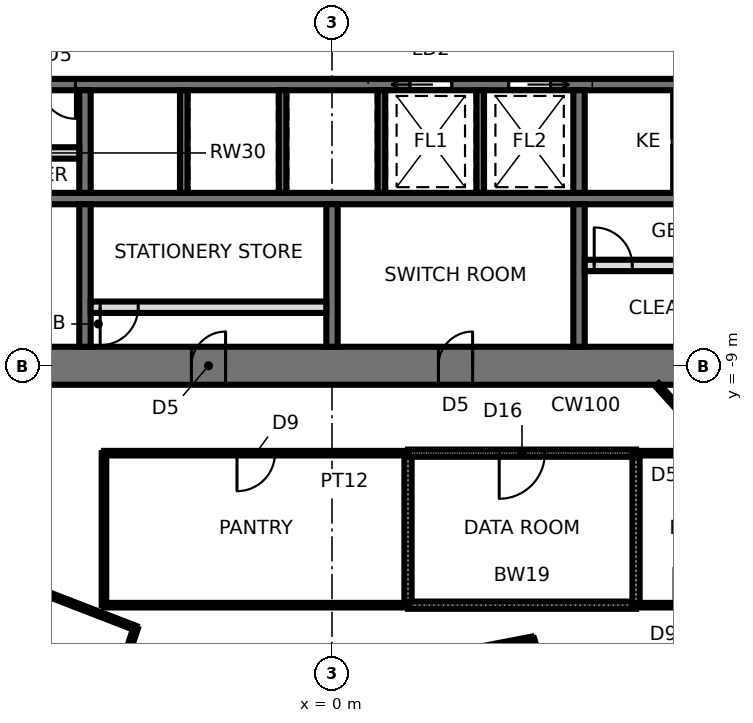
"""IFC4 building model, lengths in metres.
Left out: names, types, materials, properties, quantities, classifications, styles, units other than length and angle.
Written with IfcOpenShell. Run it as: python <this file> out.ifc"""

import sys

from ifc_helpers import new_model, si_unit, direction, frame, frame_2d, origin, place, context, subcontext, project, spatial, rectangle, extrude, element, fill, save


model = new_model("IFC4")
c1 = context("Model", 3, precision=1e-05, world=origin(), true_north=direction((0.0, 1.0)))
c2 = subcontext(c1, "Body", "Model", "MODEL_VIEW")
j1 = project(units=[si_unit("LENGTHUNIT", "METRE"), si_unit("PLANEANGLEUNIT", "RADIAN")], contexts=[c1])
p1 = place(None, origin())
s1 = spatial("IfcSite", under=j1, at=p1, CompositionType="ELEMENT")
p2 = place(p1, origin())
s2 = spatial("IfcBuilding", under=s1, at=p2, CompositionType="ELEMENT")
p3 = place(p2, frame((0.0, 0.0, 57.4)))
s3 = spatial("IfcBuildingStorey", under=s2, at=p3, CompositionType="ELEMENT", Elevation=57.4)
p4 = place(p3, frame((-13.2, -9.0, 0.0), z_axis=(0.0, 0.0, 1.0), x_axis=(1.0, 0.0, 0.0)))
e1 = element("IfcWall", 1, at=p4, inside=s3, PredefinedType="SHEAR", context=c2, shape_type="SweptSolid", body=[
    extrude(rectangle(XDim=26.4, YDim=1.0, at=frame_2d((13.2, 0.0))), origin(), (0.0, 0.0, 1.0), 4.2),
])
p5 = place(p4, frame((2.65, 0.0, 0.0)))
e2 = element("IfcOpeningElement", 2, at=p5, cuts=e1, PredefinedType="OPENING", context=c2, shape_type="SweptSolid", body=[
    extrude(rectangle(XDim=0.9, YDim=2.1, at=frame_2d((0.45, 1.05))), frame((0.0, 0.51, 0.0), z_axis=(0.0, -1.0, 0.0), x_axis=(1.0, 0.0, 0.0)), (0.0, 0.0, 1.0), 1.02),
])
p6 = place(p4, frame((9.5, 0.0, 0.0)))
e3 = element("IfcOpeningElement", 3, at=p6, cuts=e1, PredefinedType="OPENING", context=c2, shape_type="SweptSolid", body=[
    extrude(rectangle(XDim=0.9, YDim=2.1, at=frame_2d((0.45, 1.05))), frame((0.0, 0.51, 0.0), z_axis=(0.0, -1.0, 0.0), x_axis=(1.0, 0.0, 0.0)), (0.0, 0.0, 1.0), 1.02),
])
p7 = place(p4, frame((16.0, 0.0, 0.0)))
e4 = element("IfcOpeningElement", 4, at=p7, cuts=e1, PredefinedType="OPENING", context=c2, shape_type="SweptSolid", body=[
    extrude(rectangle(XDim=0.9, YDim=2.1, at=frame_2d((0.45, 1.05))), frame((0.0, 0.51, 0.0), z_axis=(0.0, -1.0, 0.0), x_axis=(1.0, 0.0, 0.0)), (0.0, 0.0, 1.0), 1.02),
])
p8 = place(p4, frame((22.85, 0.0, 0.0)))
e5 = element("IfcOpeningElement", 5, at=p8, cuts=e1, PredefinedType="OPENING", context=c2, shape_type="SweptSolid", body=[
    extrude(rectangle(XDim=0.9, YDim=2.1, at=frame_2d((0.45, 1.05))), frame((0.0, 0.51, 0.0), z_axis=(0.0, -1.0, 0.0), x_axis=(1.0, 0.0, 0.0)), (0.0, 0.0, 1.0), 1.02),
])
p9 = place(p3, frame((-13.2, -1.6, 0.0), z_axis=(0.0, 0.0, 1.0), x_axis=(1.0, 0.0, 0.0)))
e6 = element("IfcWall", 6, at=p9, inside=s3, PredefinedType="SHEAR", context=c2, shape_type="SweptSolid", body=[
    extrude(rectangle(XDim=26.4, YDim=0.3, at=frame_2d((13.2, 0.0))), origin(), (0.0, 0.0, 1.0), 4.2),
])
p10 = place(p9, frame((25.15, 0.0, 0.0)))
e7 = element("IfcOpeningElement", 7, at=p10, cuts=e6, PredefinedType="OPENING", context=c2, shape_type="SweptSolid", body=[
    extrude(rectangle(XDim=1.0, YDim=2.1, at=frame_2d((0.5, 1.05))), frame((0.0, 0.16, 0.0), z_axis=(0.0, -1.0, 0.0), x_axis=(1.0, 0.0, 0.0)), (0.0, 0.0, 1.0), 0.32),
])
p11 = place(p9, frame((15.25, 0.0, 0.0)))
e8 = element("IfcOpeningElement", 8, at=p11, cuts=e6, PredefinedType="OPENING", context=c2, shape_type="SweptSolid", body=[
    extrude(rectangle(XDim=1.1, YDim=2.3, at=frame_2d((0.55, 1.15))), frame((0.0, 0.16, 0.0), z_axis=(0.0, -1.0, 0.0), x_axis=(1.0, 0.0, 0.0)), (0.0, 0.0, 1.0), 0.32),
])
p12 = place(p9, frame((17.85, 0.0, 0.0)))
e9 = element("IfcOpeningElement", 9, at=p12, cuts=e6, PredefinedType="OPENING", context=c2, shape_type="SweptSolid", body=[
    extrude(rectangle(XDim=1.1, YDim=2.3, at=frame_2d((0.55, 1.15))), frame((0.0, 0.16, 0.0), z_axis=(0.0, -1.0, 0.0), x_axis=(1.0, 0.0, 0.0)), (0.0, 0.0, 1.0), 0.32),
])
p13 = place(p9, frame((5.55, 0.0, 0.0)))
e10 = element("IfcOpeningElement", 10, at=p13, cuts=e6, PredefinedType="OPENING", context=c2, shape_type="SweptSolid", body=[
    extrude(rectangle(XDim=0.9, YDim=2.1, at=frame_2d((0.45, 1.05))), frame((0.0, 0.16, 0.0), z_axis=(0.0, -1.0, 0.0), x_axis=(1.0, 0.0, 0.0)), (0.0, 0.0, 1.0), 0.32),
])
p14 = place(p3, frame((-13.2, -4.6, 0.0), z_axis=(0.0, 0.0, 1.0), x_axis=(1.0, 0.0, 0.0)))
e11 = element("IfcWall", 11, at=p14, inside=s3, PredefinedType="SHEAR", context=c2, shape_type="SweptSolid", body=[
    extrude(rectangle(XDim=26.4, YDim=0.3, at=frame_2d((13.2, 0.0))), origin(), (0.0, 0.0, 1.0), 4.2),
])
p15 = place(p3, frame((-6.5, -1.75, 0.0), z_axis=(0.0, 0.0, 1.0), x_axis=(0.0, -1.0, 0.0)))
e12 = element("IfcWall", 12, at=p15, inside=s3, PredefinedType="SHEAR", context=c2, shape_type="SweptSolid", body=[
    extrude(rectangle(XDim=2.7, YDim=0.3, at=frame_2d((1.35, 0.0))), origin(), (0.0, 0.0, 1.0), 4.2),
])
p16 = place(p3, frame((-6.5, -4.75, 0.0), z_axis=(0.0, 0.0, 1.0), x_axis=(0.0, -1.0, 0.0)))
e13 = element("IfcWall", 13, at=p16, inside=s3, PredefinedType="SHEAR", context=c2, shape_type="SweptSolid", body=[
    extrude(rectangle(XDim=3.75, YDim=0.3, at=frame_2d((1.875, 0.0))), origin(), (0.0, 0.0, 1.0), 4.2),
])
p17 = place(p3, frame((6.5, -1.75, 0.0), z_axis=(0.0, 0.0, 1.0), x_axis=(0.0, -1.0, 0.0)))
e14 = element("IfcWall", 14, at=p17, inside=s3, PredefinedType="SHEAR", context=c2, shape_type="SweptSolid", body=[
    extrude(rectangle(XDim=2.7, YDim=0.3, at=frame_2d((1.35, 0.0))), origin(), (0.0, 0.0, 1.0), 4.2),
])
p18 = place(p3, frame((6.5, -4.75, 0.0), z_axis=(0.0, 0.0, 1.0), x_axis=(0.0, -1.0, 0.0)))
e15 = element("IfcWall", 15, at=p18, inside=s3, PredefinedType="SHEAR", context=c2, shape_type="SweptSolid", body=[
    extrude(rectangle(XDim=3.75, YDim=0.3, at=frame_2d((1.875, 0.0))), origin(), (0.0, 0.0, 1.0), 4.2),
])
for number, where, z_axis, x_axis in (
    (16, (-3.9, -1.75, 0.0), (0.0, 0.0, 1.0), (0.0, -1.0, 0.0)),
    (17, (-1.3, -1.75, 0.0), (0.0, 0.0, 1.0), (0.0, -1.0, 0.0)),
    (18, (1.3, -1.75, 0.0), (0.0, 0.0, 1.0), (0.0, -1.0, 0.0)),
    (19, (3.9, -1.75, 0.0), (0.0, 0.0, 1.0), (0.0, -1.0, 0.0)),
):
    element("IfcWall", number, at=place(p3, frame(where, z_axis=z_axis, x_axis=x_axis)), inside=s3, PredefinedType="SHEAR", context=c2, shape_type="SweptSolid", body=[
        extrude(rectangle(XDim=2.7, YDim=0.2, at=frame_2d((1.35, 0.0))), origin(), (0.0, 0.0, 1.0), 4.2),
    ])
p19 = place(p3, frame((0.0, -4.75, 0.0), z_axis=(0.0, 0.0, 1.0), x_axis=(0.0, -1.0, 0.0)))
e20 = element("IfcWall", 20, at=p19, inside=s3, PredefinedType="SHEAR", context=c2, shape_type="SweptSolid", body=[
    extrude(rectangle(XDim=3.75, YDim=0.3, at=frame_2d((1.875, 0.0))), origin(), (0.0, 0.0, 1.0), 4.2),
])
p20 = place(p3, frame((-6.35, -7.46, 0.0), z_axis=(0.0, 0.0, 1.0), x_axis=(1.0, 0.0, 0.0)))
e21 = element("IfcWall", 21, at=p20, inside=s3, PredefinedType="PARTITIONING", context=c2, shape_type="SweptSolid", body=[
    extrude(rectangle(XDim=6.2, YDim=0.3, at=frame_2d((3.1, 0.0))), origin(), (0.0, 0.0, 1.0), 4.04),
])
p21 = place(p20, frame((0.25, 0.0, 0.0)))
e22 = element("IfcOpeningElement", 22, at=p21, cuts=e21, PredefinedType="OPENING", context=c2, shape_type="SweptSolid", body=[
    extrude(rectangle(XDim=1.0, YDim=2.4, at=frame_2d((0.5, 1.2))), frame((0.0, 0.16, 0.0), z_axis=(0.0, -1.0, 0.0), x_axis=(1.0, 0.0, 0.0)), (0.0, 0.0, 1.0), 0.32),
])
p22 = place(p3, frame((6.65, -6.36, 0.0), z_axis=(0.0, 0.0, 1.0), x_axis=(1.0, 0.0, 0.0)))
e23 = element("IfcWall", 23, at=p22, inside=s3, PredefinedType="PARTITIONING", context=c2, shape_type="SweptSolid", body=[
    extrude(rectangle(XDim=6.55, YDim=0.3, at=frame_2d((3.275, 0.0))), origin(), (0.0, 0.0, 1.0), 4.04),
])
p23 = place(p22, frame((0.25, 0.0, 0.0)))
e24 = element("IfcOpeningElement", 24, at=p23, cuts=e23, PredefinedType="OPENING", context=c2, shape_type="SweptSolid", body=[
    extrude(rectangle(XDim=1.0, YDim=2.4, at=frame_2d((0.5, 1.2))), frame((0.0, 0.16, 0.0), z_axis=(0.0, -1.0, 0.0), x_axis=(1.0, 0.0, 0.0)), (0.0, 0.0, 1.0), 0.32),
])
p24 = place(p3, frame((-13.2, -3.4, 0.0), z_axis=(0.0, 0.0, 1.0), x_axis=(1.0, 0.0, 0.0)))
e25 = element("IfcWall", 25, at=p24, inside=s3, PredefinedType="SOLIDWALL", context=c2, shape_type="SweptSolid", body=[
    extrude(rectangle(XDim=6.55, YDim=0.3, at=frame_2d((3.275, 0.0))), origin(), (0.0, 0.0, 1.0), 4.04),
])
p25 = place(p24, frame((0.25, 0.0, 0.0)))
e26 = element("IfcOpeningElement", 26, at=p25, cuts=e25, PredefinedType="OPENING", context=c2, shape_type="SweptSolid", body=[
    extrude(rectangle(XDim=0.9, YDim=2.1, at=frame_2d((0.45, 1.05))), frame((0.0, 0.16, 0.0), z_axis=(0.0, -1.0, 0.0), x_axis=(1.0, 0.0, 0.0)), (0.0, 0.0, 1.0), 0.32),
])
p26 = place(p3, frame((-6.0, -11.3, 0.0), z_axis=(0.0, 0.0, 1.0), x_axis=(0.0, -1.0, 0.0)))
e27 = element("IfcWall", 27, at=p26, inside=s3, PredefinedType="PARTITIONING", context=c2, shape_type="SweptSolid", body=[
    extrude(rectangle(XDim=4.0, YDim=0.12, at=frame_2d((2.0, 0.0))), origin(), (0.0, 0.0, 1.0), 4.04),
])
p27 = place(p3, frame((-5.167, -15.903, 0.0), z_axis=(0.0, 0.0, 1.0), x_axis=(-0.932804495801, 0.360382813983, 0.0)))
e28 = element("IfcWall", 28, at=p27, inside=s3, PredefinedType="PARTITIONING", context=c2, shape_type="SweptSolid", body=[
    extrude(rectangle(XDim=3.519, YDim=0.12, at=frame_2d((1.759, 0.0))), origin(), (0.0, 0.0, 1.0), 4.04),
])
p28 = place(p3, frame((-7.33, -22.56, 0.0), z_axis=(0.0, 0.0, 1.0), x_axis=(0.309009574742, 0.951058927048, 0.0)))
e29 = element("IfcWall", 29, at=p28, inside=s3, PredefinedType="PARTITIONING", context=c2, shape_type="SweptSolid", body=[
    extrude(rectangle(XDim=7.0, YDim=0.12, at=frame_2d((3.5, 0.0))), origin(), (0.0, 0.0, 1.0), 2.84),
])
p29 = place(p28, frame((2.621, 0.0, 0.0)))
e30 = element("IfcOpeningElement", 30, at=p29, cuts=e29, PredefinedType="OPENING", context=c2, shape_type="SweptSolid", body=[
    extrude(rectangle(XDim=1.0, YDim=2.4, at=frame_2d((0.5, 1.2))), frame((0.0, 0.07, 0.0), z_axis=(0.0, -1.0, 0.0), x_axis=(1.0, 0.0, 0.0)), (0.0, 0.0, 1.0), 0.14),
])
p30 = place(p3, frame((2.0, -11.3, 0.0), z_axis=(0.0, 0.0, 1.0), x_axis=(-1.0, 0.0, 0.0)))
e31 = element("IfcWall", 31, at=p30, inside=s3, PredefinedType="PARTITIONING", context=c2, shape_type="SweptSolid", body=[
    extrude(rectangle(XDim=8.0, YDim=0.12, at=frame_2d((4.0, 0.0))), origin(), (0.0, 0.0, 1.0), 4.04),
])
p31 = place(p30, frame((3.5, 0.0, 0.0)))
e32 = element("IfcOpeningElement", 32, at=p31, cuts=e31, PredefinedType="OPENING", context=c2, shape_type="SweptSolid", body=[
    extrude(rectangle(XDim=1.0, YDim=2.4, at=frame_2d((0.5, 1.2))), frame((0.0, 0.07, 0.0), z_axis=(0.0, -1.0, 0.0), x_axis=(1.0, 0.0, 0.0)), (0.0, 0.0, 1.0), 0.14),
])
p32 = place(p3, frame((-6.0, -15.3, 0.0), z_axis=(0.0, 0.0, 1.0), x_axis=(1.0, 0.0, 0.0)))
e33 = element("IfcWall", 33, at=p32, inside=s3, PredefinedType="PARTITIONING", context=c2, shape_type="SweptSolid", body=[
    extrude(rectangle(XDim=8.0, YDim=0.12, at=frame_2d((4.0, 0.0))), origin(), (0.0, 0.0, 1.0), 3.586),
])
p33 = place(p3, frame((2.0, -11.3, 0.0), z_axis=(0.0, 0.0, 1.0), x_axis=(0.0, -1.0, 0.0)))
e34 = element("IfcWall", 34, at=p33, inside=s3, PredefinedType="SOLIDWALL", context=c2, shape_type="SweptSolid", body=[
    extrude(rectangle(XDim=4.0, YDim=0.19, at=frame_2d((2.0, 0.0))), origin(), (0.0, 0.0, 1.0), 4.04),
])
p34 = place(p3, frame((5.26, -16.188, 0.0), z_axis=(0.0, 0.0, 1.0), x_axis=(-0.982089213151, -0.188416499842, 0.0)))
e35 = element("IfcWall", 35, at=p34, inside=s3, PredefinedType="PARTITIONING", context=c2, shape_type="SweptSolid", body=[
    extrude(rectangle(XDim=3.552, YDim=0.12, at=frame_2d((1.776, 0.0))), origin(), (0.0, 0.0, 1.0), 4.04),
])
p35 = place(p3, frame((7.33, -22.56, 0.0), z_axis=(0.0, 0.0, 1.0), x_axis=(-0.309003676349, 0.951060843481, 0.0)))
e36 = element("IfcWall", 36, at=p35, inside=s3, PredefinedType="PARTITIONING", context=c2, shape_type="SweptSolid", body=[
    extrude(rectangle(XDim=6.7, YDim=0.12, at=frame_2d((3.35, 0.0))), origin(), (0.0, 0.0, 1.0), 2.84),
])
p36 = place(p3, frame((2.0, -15.3, 0.0), z_axis=(0.0, 0.0, 1.0), x_axis=(1.0, 0.0, 0.0)))
e37 = element("IfcWall", 37, at=p36, inside=s3, PredefinedType="SOLIDWALL", context=c2, shape_type="SweptSolid", body=[
    extrude(rectangle(XDim=6.0, YDim=0.19, at=frame_2d((3.0, 0.0))), origin(), (0.0, 0.0, 1.0), 3.586),
])
p37 = place(p3, frame((8.0, -11.3, 0.0), z_axis=(0.0, 0.0, 1.0), x_axis=(-1.0, 0.0, 0.0)))
e38 = element("IfcWall", 38, at=p37, inside=s3, PredefinedType="SOLIDWALL", context=c2, shape_type="SweptSolid", body=[
    extrude(rectangle(XDim=6.0, YDim=0.19, at=frame_2d((3.0, 0.0))), origin(), (0.0, 0.0, 1.0), 4.04),
])
p38 = place(p37, frame((2.4, 0.0, 0.0)))
e39 = element("IfcOpeningElement", 39, at=p38, cuts=e38, PredefinedType="OPENING", context=c2, shape_type="SweptSolid", body=[
    extrude(rectangle(XDim=1.2, YDim=2.1, at=frame_2d((0.6, 1.05))), frame((0.0, 0.105, 0.0), z_axis=(0.0, -1.0, 0.0), x_axis=(1.0, 0.0, 0.0)), (0.0, 0.0, 1.0), 0.21),
])
p39 = place(p3, frame((8.0, -11.3, 0.0), z_axis=(0.0, 0.0, 1.0), x_axis=(0.0, -1.0, 0.0)))
e40 = element("IfcWall", 40, at=p39, inside=s3, PredefinedType="SOLIDWALL", context=c2, shape_type="SweptSolid", body=[
    extrude(rectangle(XDim=4.0, YDim=0.19, at=frame_2d((2.0, 0.0))), origin(), (0.0, 0.0, 1.0), 4.04),
])
p40 = place(p3, frame((8.0, -15.3, 0.0), z_axis=(0.0, 0.0, 1.0), x_axis=(1.0, 0.0, 0.0)))
e41 = element("IfcWall", 41, at=p40, inside=s3, PredefinedType="PARTITIONING", context=c2, shape_type="SweptSolid", body=[
    extrude(rectangle(XDim=5.0, YDim=0.12, at=frame_2d((2.5, 0.0))), origin(), (0.0, 0.0, 1.0), 4.04),
])
p41 = place(p40, frame((1.0, 0.0, 0.0)))
e42 = element("IfcOpeningElement", 42, at=p41, cuts=e41, PredefinedType="OPENING", context=c2, shape_type="SweptSolid", body=[
    extrude(rectangle(XDim=1.0, YDim=2.4, at=frame_2d((0.5, 1.2))), frame((0.0, 0.07, 0.0), z_axis=(0.0, -1.0, 0.0), x_axis=(1.0, 0.0, 0.0)), (0.0, 0.0, 1.0), 0.14),
])
p42 = place(p3, frame((10.175, -11.3, 0.0), z_axis=(0.0, 0.0, 1.0), x_axis=(-0.669148472958, 0.74312873793, 0.0)))
e43 = element("IfcWall", 43, at=p42, inside=s3, PredefinedType="PARTITIONING", context=c2, shape_type="SweptSolid", body=[
    extrude(rectangle(XDim=2.422, YDim=0.12, at=frame_2d((1.211, 0.0))), origin(), (0.0, 0.0, 1.0), 4.04),
])
p43 = place(p3, frame((13.0, -11.3, 0.0), z_axis=(0.0, 0.0, 1.0), x_axis=(-1.0, 0.0, 0.0)))
e44 = element("IfcWall", 44, at=p43, inside=s3, PredefinedType="PARTITIONING", context=c2, shape_type="SweptSolid", body=[
    extrude(rectangle(XDim=5.0, YDim=0.12, at=frame_2d((2.5, 0.0))), origin(), (0.0, 0.0, 1.0), 4.04),
])
p44 = place(p11, frame((1.1, 0.0, 0.0), z_axis=(0.0, 0.0, 1.0), x_axis=(-1.0, 0.0, 0.0)))
e45 = element("IfcDoor", 45, at=p44, inside=s3, OperationType="SLIDING_TO_RIGHT", PredefinedType="DOOR", context=c2, shape_type="SweptSolid", body=[
    extrude(rectangle(XDim=1.1, YDim=2.3, at=frame_2d((0.55, 1.15))), frame((0.0, 0.025, 0.0), z_axis=(0.0, -1.0, 0.0), x_axis=(1.0, 0.0, 0.0)), (0.0, 0.0, 1.0), 0.05),
])
fill(e8, e45)
p45 = place(p12, frame((1.1, 0.0, 0.0), z_axis=(0.0, 0.0, 1.0), x_axis=(-1.0, 0.0, 0.0)))
e46 = element("IfcDoor", 46, at=p45, inside=s3, OperationType="SLIDING_TO_LEFT", PredefinedType="DOOR", context=c2, shape_type="SweptSolid", body=[
    extrude(rectangle(XDim=1.1, YDim=2.3, at=frame_2d((0.55, 1.15))), frame((0.0, 0.025, 0.0), z_axis=(0.0, -1.0, 0.0), x_axis=(1.0, 0.0, 0.0)), (0.0, 0.0, 1.0), 0.05),
])
fill(e9, e46)
p46 = place(p13, frame((0.9, 0.0, 0.0), z_axis=(0.0, 0.0, 1.0), x_axis=(-1.0, 0.0, 0.0)))
e47 = element("IfcDoor", 47, at=p46, inside=s3, OperationType="SINGLE_SWING_LEFT", PredefinedType="DOOR", context=c2, shape_type="SweptSolid", body=[
    extrude(rectangle(XDim=0.9, YDim=2.1, at=frame_2d((0.45, 1.05))), frame((0.0, 0.025, 0.0), z_axis=(0.0, -1.0, 0.0), x_axis=(1.0, 0.0, 0.0)), (0.0, 0.0, 1.0), 0.05),
])
fill(e10, e47)
p47 = place(p6, origin())
e48 = element("IfcDoor", 48, at=p47, inside=s3, OperationType="SINGLE_SWING_RIGHT", PredefinedType="DOOR", context=c2, shape_type="SweptSolid", body=[
    extrude(rectangle(XDim=0.82, YDim=2.06, at=frame_2d((0.45, 1.03))), frame((0.0, 0.025, 0.0), z_axis=(0.0, -1.0, 0.0), x_axis=(1.0, 0.0, 0.0)), (0.0, 0.0, 1.0), 0.05),
    extrude(rectangle(XDim=0.04, YDim=2.1, at=frame_2d((0.02, 1.05))), frame((0.0, 0.25, 0.0), z_axis=(0.0, -1.0, 0.0), x_axis=(1.0, 0.0, 0.0)), (0.0, 0.0, 1.0), 0.5),
    extrude(rectangle(XDim=0.04, YDim=2.1, at=frame_2d((0.88, 1.05))), frame((0.0, 0.25, 0.0), z_axis=(0.0, -1.0, 0.0), x_axis=(1.0, 0.0, 0.0)), (0.0, 0.0, 1.0), 0.5),
    extrude(rectangle(XDim=0.82, YDim=0.04, at=frame_2d((0.45, 2.08))), frame((0.0, 0.25, 0.0), z_axis=(0.0, -1.0, 0.0), x_axis=(1.0, 0.0, 0.0)), (0.0, 0.0, 1.0), 0.5),
])
fill(e3, e48)
p48 = place(p7, origin())
e49 = element("IfcDoor", 49, at=p48, inside=s3, OperationType="SINGLE_SWING_RIGHT", PredefinedType="DOOR", context=c2, shape_type="SweptSolid", body=[
    extrude(rectangle(XDim=0.82, YDim=2.06, at=frame_2d((0.45, 1.03))), frame((0.0, 0.025, 0.0), z_axis=(0.0, -1.0, 0.0), x_axis=(1.0, 0.0, 0.0)), (0.0, 0.0, 1.0), 0.05),
    extrude(rectangle(XDim=0.04, YDim=2.1, at=frame_2d((0.02, 1.05))), frame((0.0, 0.25, 0.0), z_axis=(0.0, -1.0, 0.0), x_axis=(1.0, 0.0, 0.0)), (0.0, 0.0, 1.0), 0.5),
    extrude(rectangle(XDim=0.04, YDim=2.1, at=frame_2d((0.88, 1.05))), frame((0.0, 0.25, 0.0), z_axis=(0.0, -1.0, 0.0), x_axis=(1.0, 0.0, 0.0)), (0.0, 0.0, 1.0), 0.5),
    extrude(rectangle(XDim=0.82, YDim=0.04, at=frame_2d((0.45, 2.08))), frame((0.0, 0.25, 0.0), z_axis=(0.0, -1.0, 0.0), x_axis=(1.0, 0.0, 0.0)), (0.0, 0.0, 1.0), 0.5),
])
fill(e4, e49)
p49 = place(p21, frame((1.0, 0.0, 0.0), z_axis=(0.0, 0.0, 1.0), x_axis=(-1.0, 0.0, 0.0)))
e50 = element("IfcDoor", 50, at=p49, inside=s3, OperationType="SINGLE_SWING_RIGHT", PredefinedType="DOOR", context=c2, shape_type="SweptSolid", body=[
    extrude(rectangle(XDim=1.0, YDim=2.4, at=frame_2d((0.5, 1.2))), frame((0.0, 0.025, 0.0), z_axis=(0.0, -1.0, 0.0), x_axis=(1.0, 0.0, 0.0)), (0.0, 0.0, 1.0), 0.05),
])
fill(e22, e50)
p50 = place(p23, origin())
e51 = element("IfcDoor", 51, at=p50, inside=s3, OperationType="SINGLE_SWING_LEFT", PredefinedType="DOOR", context=c2, shape_type="SweptSolid", body=[
    extrude(rectangle(XDim=1.0, YDim=2.4, at=frame_2d((0.5, 1.2))), frame((0.0, 0.025, 0.0), z_axis=(0.0, -1.0, 0.0), x_axis=(1.0, 0.0, 0.0)), (0.0, 0.0, 1.0), 0.05),
])
fill(e24, e51)
p51 = place(p31, origin())
e52 = element("IfcDoor", 52, at=p51, inside=s3, OperationType="SINGLE_SWING_RIGHT", PredefinedType="DOOR", context=c2, shape_type="SweptSolid", body=[
    extrude(rectangle(XDim=1.0, YDim=2.4, at=frame_2d((0.5, 1.2))), frame((0.0, 0.025, 0.0), z_axis=(0.0, -1.0, 0.0), x_axis=(1.0, 0.0, 0.0)), (0.0, 0.0, 1.0), 0.05),
])
fill(e32, e52)
p52 = place(p38, origin())
e53 = element("IfcDoor", 53, at=p52, inside=s3, OperationType="SINGLE_SWING_RIGHT", PredefinedType="DOOR", context=c2, shape_type="SweptSolid", body=[
    extrude(rectangle(XDim=1.2, YDim=2.1, at=frame_2d((0.6, 1.05))), frame((0.0, 0.025, 0.0), z_axis=(0.0, -1.0, 0.0), x_axis=(1.0, 0.0, 0.0)), (0.0, 0.0, 1.0), 0.05),
])
fill(e39, e53)
save(model, sys.argv[1])
